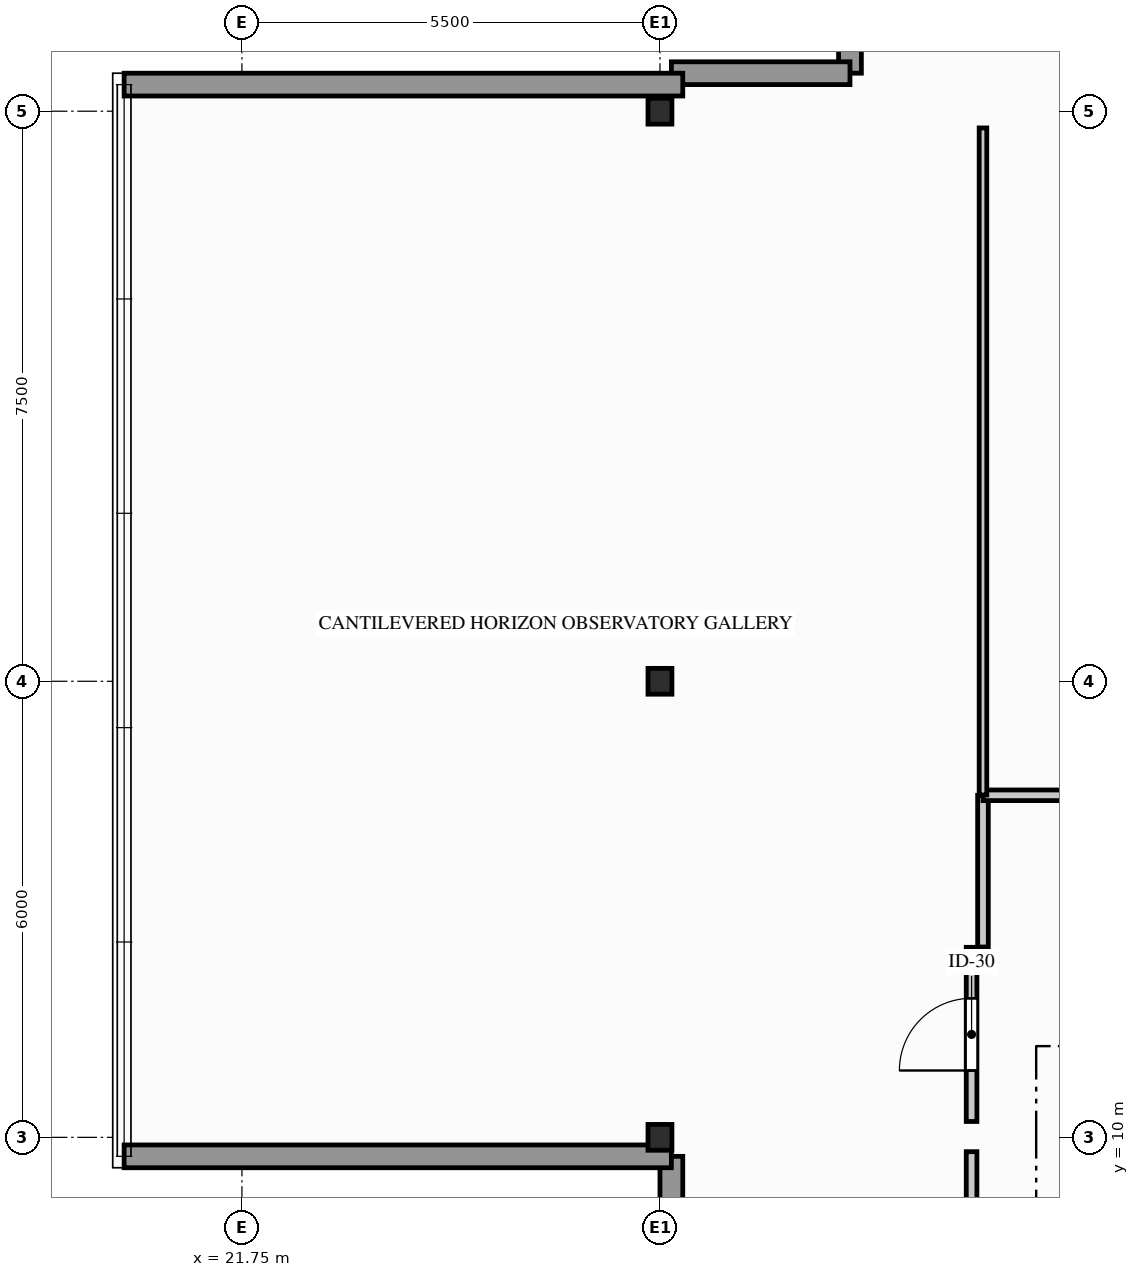
"""IFC4 building model, lengths in metres.
Left out: names, types, materials, properties, quantities, classifications, styles, units other than length and angle.
Written with IfcOpenShell. Run it as: python <this file> out.ifc"""

import sys

from ifc_helpers import new_model, si_unit, direction, frame, frame_2d, origin, origin_2d, place, context, subcontext, project, spatial, rectangle, i_section, extrude, element, fill, save


model = new_model("IFC4")
c1 = context("Model", 3, precision=1e-05, world=origin(), true_north=direction((0.0, 1.0)))
c2 = subcontext(c1, "Body", "Model", "MODEL_VIEW")
j1 = project(units=[si_unit("LENGTHUNIT", "METRE"), si_unit("PLANEANGLEUNIT", "RADIAN")], contexts=[c1])
p1 = place(None, origin())
s1 = spatial("IfcSite", under=j1, at=p1, CompositionType="ELEMENT")
p2 = place(p1, origin())
s2 = spatial("IfcBuilding", under=s1, at=p2, CompositionType="ELEMENT")
p3 = place(p2, frame((0.0, 0.0, 243.65)))
s3 = spatial("IfcBuildingStorey", under=s2, at=p3, CompositionType="ELEMENT", Elevation=243.65)
for number, where, z_axis, x_axis in (
    (1, (27.25, 10.0, 0.0), (0.0, 0.0, 1.0), (1.0, 0.0, 0.0)),
    (2, (27.25, 16.0, 0.0), (0.0, 0.0, 1.0), (1.0, 0.0, 0.0)),
    (3, (27.25, 23.5, 0.0), (0.0, 0.0, 1.0), (1.0, 0.0, 0.0)),
):
    element("IfcColumn", number, at=place(p3, frame(where, z_axis=z_axis, x_axis=x_axis)), inside=s3, PredefinedType="COLUMN", context=c2, shape_type="SweptSolid", body=[
        extrude(i_section(OverallWidth=0.314, OverallDepth=0.34, WebThickness=0.019, FlangeThickness=0.031, FilletRadius=0.015, at=origin_2d()), origin(), (0.0, 0.0, 1.0), 3.6),
    ])
for number, where, z_axis, x_axis in (
    (4, (29.75, 26.35, 0.0), (0.0, 0.0, 1.0), (0.0, -1.0, 0.0)),
    (5, (29.75, 24.0, 0.0), (0.0, 0.0, 1.0), (-1.0, 0.0, 0.0)),
):
    element("IfcWall", number, at=place(p3, frame(where, z_axis=z_axis, x_axis=x_axis)), inside=s3, PredefinedType="STANDARD", context=c2, shape_type="SweptSolid", body=[
        extrude(rectangle(XDim=2.35, YDim=0.3, at=frame_2d((1.175, 0.0))), origin(), (0.0, 0.0, 1.0), 3.34),
    ])
p4 = place(p3, frame((27.4, 9.75, 0.0), z_axis=(0.0, 0.0, 1.0), x_axis=(0.0, -1.0, 0.0)))
e6 = element("IfcWall", 6, at=p4, inside=s3, PredefinedType="STANDARD", context=c2, shape_type="SweptSolid", body=[
    extrude(rectangle(XDim=7.25, YDim=0.3, at=frame_2d((3.625, 0.0))), origin(), (0.0, 0.0, 1.0), 3.34),
])
p5 = place(p3, frame((27.4, 9.75, 0.0), z_axis=(0.0, 0.0, 1.0), x_axis=(-1.0, 0.0, 0.0)))
e7 = element("IfcWall", 7, at=p5, inside=s3, PredefinedType="STANDARD", context=c2, shape_type="SweptSolid", body=[
    extrude(rectangle(XDim=7.2, YDim=0.3, at=frame_2d((3.6, 0.0))), origin(), (0.0, 0.0, 1.0), 2.279),
])
p6 = place(p3, frame((20.2, 23.85, 0.0), z_axis=(0.0, 0.0, 1.0), x_axis=(1.0, 0.0, 0.0)))
e8 = element("IfcWall", 8, at=p6, inside=s3, PredefinedType="STANDARD", context=c2, shape_type="SweptSolid", body=[
    extrude(rectangle(XDim=7.35, YDim=0.3, at=frame_2d((3.675, 0.0))), origin(), (0.0, 0.0, 1.0), 3.34),
])
p7 = place(p3, frame((31.35, 2.589, 0.0), z_axis=(0.0, 0.0, 1.0), x_axis=(0.0, 1.0, 0.0)))
e9 = element("IfcWall", 9, at=p7, inside=s3, PredefinedType="PARTITIONING", context=c2, shape_type="SweptSolid", body=[
    extrude(rectangle(XDim=7.223, YDim=0.14, at=frame_2d((3.611, 0.0))), origin(), (0.0, 0.0, 1.0), 3.34),
])
p8 = place(p7, frame((3.136, 0.0, 0.0)))
e10 = element("IfcOpeningElement", 10, at=p8, cuts=e9, PredefinedType="OPENING", context=c2, shape_type="SweptSolid", body=[
    extrude(rectangle(XDim=0.95, YDim=2.05, at=frame_2d((0.475, 1.025))), frame((0.0, 0.08, 0.0), z_axis=(0.0, -1.0, 0.0), x_axis=(1.0, 0.0, 0.0)), (0.0, 0.0, 1.0), 0.16),
])
p9 = place(p3, frame((31.35, 10.209, 0.0), z_axis=(0.0, 0.0, 1.0), x_axis=(0.0, 1.0, 0.0)))
e11 = element("IfcWall", 11, at=p9, inside=s3, PredefinedType="PARTITIONING", context=c2, shape_type="SweptSolid", body=[
    extrude(rectangle(XDim=2.291, YDim=0.14, at=frame_2d((1.146, 0.0))), origin(), (0.0, 0.0, 1.0), 3.34),
])
p10 = place(p9, frame((0.671, 0.0, 0.0)))
e12 = element("IfcOpeningElement", 12, at=p10, cuts=e11, PredefinedType="OPENING", context=c2, shape_type="SweptSolid", body=[
    extrude(rectangle(XDim=0.95, YDim=2.05, at=frame_2d((0.475, 1.025))), frame((0.0, 0.08, 0.0), z_axis=(0.0, -1.0, 0.0), x_axis=(1.0, 0.0, 0.0)), (0.0, 0.0, 1.0), 0.16),
])
p11 = place(p3, frame((31.5, 12.504, 0.0), z_axis=(0.0, 0.0, 1.0), x_axis=(0.0, 1.0, 0.0)))
e13 = element("IfcWall", 13, at=p11, inside=s3, PredefinedType="PARTITIONING", context=c2, shape_type="SweptSolid", body=[
    extrude(rectangle(XDim=1.996, YDim=0.14, at=frame_2d((0.998, 0.0))), origin(), (0.0, 0.0, 1.0), 3.34),
])
p12 = place(p3, frame((31.5, 14.5, 0.0), z_axis=(0.0, 0.0, 1.0), x_axis=(1.0, 0.0, 0.0)))
e14 = element("IfcWall", 14, at=p12, inside=s3, PredefinedType="PARTITIONING", context=c2, shape_type="SweptSolid", body=[
    extrude(rectangle(XDim=10.011, YDim=0.14, at=frame_2d((5.006, 0.0))), origin(), (0.0, 0.0, 1.0), 2.703),
])
p13 = place(p12, frame((4.531, 0.0, 0.0)))
e15 = element("IfcOpeningElement", 15, at=p13, cuts=e14, PredefinedType="OPENING", context=c2, shape_type="SweptSolid", body=[
    extrude(rectangle(XDim=0.95, YDim=2.05, at=frame_2d((0.475, 1.025))), frame((0.0, 0.08, 0.0), z_axis=(0.0, -1.0, 0.0), x_axis=(1.0, 0.0, 0.0)), (0.0, 0.0, 1.0), 0.16),
])
p14 = place(p3, frame((31.5, 14.504, 0.0), z_axis=(0.0, 0.0, 1.0), x_axis=(0.0, 1.0, 0.0)))
e16 = element("IfcWall", 16, at=p14, inside=s3, PredefinedType="PARTITIONING", context=c2, shape_type="SweptSolid", body=[
    extrude(rectangle(XDim=8.776, YDim=0.1, at=frame_2d((4.388, 0.0))), origin(), (0.0, 0.0, 1.0), 2.279),
])
p15 = place(p10, origin())
e17 = element("IfcDoor", 17, at=p15, inside=s3, OperationType="SINGLE_SWING_LEFT", PredefinedType="DOOR", context=c2, shape_type="SweptSolid", body=[
    extrude(rectangle(XDim=0.95, YDim=2.05, at=frame_2d((0.475, 1.025))), frame((0.0, 0.025, 0.0), z_axis=(0.0, -1.0, 0.0), x_axis=(1.0, 0.0, 0.0)), (0.0, 0.0, 1.0), 0.05),
])
fill(e12, e17)
save(model, sys.argv[1])
